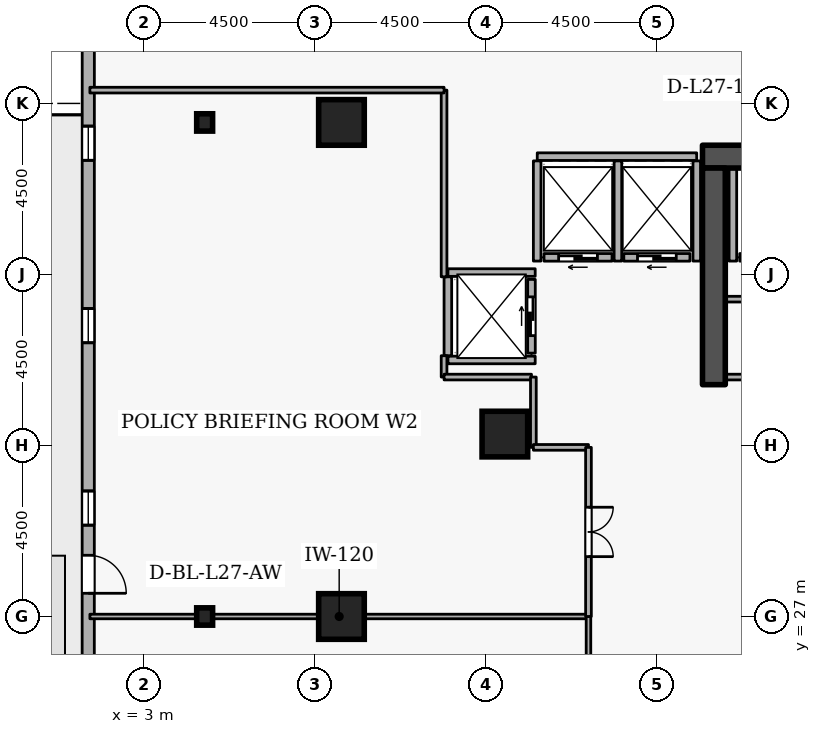
"""IFC4 building model, lengths in metres.
Left out: names, types, materials, properties, quantities, classifications, styles, units other than length and angle.
Written with IfcOpenShell. Run it as: python <this file> out.ifc"""

import sys

from ifc_helpers import new_model, si_unit, direction, frame, frame_2d, origin, origin_2d, place, context, subcontext, project, spatial, rectangle, i_section, extrude, element, fill, save


model = new_model("IFC4")
c1 = context("Model", 3, precision=1e-05, world=origin(), true_north=direction((0.0, 1.0)))
c2 = subcontext(c1, "Body", "Model", "MODEL_VIEW")
j1 = project(units=[si_unit("LENGTHUNIT", "METRE"), si_unit("PLANEANGLEUNIT", "RADIAN")], contexts=[c1])
p1 = place(None, origin())
s1 = spatial("IfcSite", under=j1, at=p1, CompositionType="ELEMENT")
p2 = place(p1, origin())
s2 = spatial("IfcBuilding", under=s1, at=p2, CompositionType="ELEMENT")
p3 = place(p2, frame((0.0, 0.0, 105.3)))
s3 = spatial("IfcBuildingStorey", under=s2, at=p3, CompositionType="ELEMENT", Elevation=105.3)
p4 = place(p3, frame((17.7, 39.1, 0.0), z_axis=(0.0, 0.0, 1.0), x_axis=(1.0, 0.0, 0.0)))
e1 = element("IfcWall", 1, at=p4, inside=s3, PredefinedType="SHEAR", context=c2, shape_type="SweptSolid", body=[
    extrude(rectangle(XDim=15.6, YDim=0.6, at=frame_2d((7.8, 0.0))), origin(), (0.0, 0.0, 1.0), 3.6),
])
p5 = place(p3, frame((18.0, 33.1, 0.0), z_axis=(0.0, 0.0, 1.0), x_axis=(0.0, 1.0, 0.0)))
e2 = element("IfcWall", 2, at=p5, inside=s3, PredefinedType="SHEAR", context=c2, shape_type="SweptSolid", body=[
    extrude(rectangle(XDim=5.7, YDim=0.6, at=frame_2d((2.85, 0.0))), origin(), (0.0, 0.0, 1.0), 3.6),
])
for number, where, z_axis, x_axis in (
    (3, (8.2, 27.0, 0.0), (0.0, 0.0, 1.0), (1.0, 0.0, 0.0)),
    (4, (8.2, 40.0, 0.0), (0.0, 0.0, 1.0), (1.0, 0.0, 0.0)),
    (5, (12.5, 31.8, 0.0), (0.0, 0.0, 1.0), (1.0, 0.0, 0.0)),
):
    element("IfcColumn", number, at=place(p3, frame(where, z_axis=z_axis, x_axis=x_axis)), inside=s3, PredefinedType="COLUMN", context=c2, shape_type="SweptSolid", body=[
        extrude(rectangle(XDim=1.2, YDim=1.2, at=origin_2d()), origin(), (0.0, 0.0, 1.0), 3.6),
    ])
for number, where, z_axis, x_axis in (
    (6, (4.6, 27.0, 0.0), (0.0, 0.0, 1.0), (1.0, 0.0, 0.0)),
    (7, (4.6, 40.0, 0.0), (0.0, 0.0, 1.0), (1.0, 0.0, 0.0)),
):
    element("IfcColumn", number, at=place(p3, frame(where, z_axis=z_axis, x_axis=x_axis)), inside=s3, PredefinedType="COLUMN", context=c2, shape_type="SweptSolid", body=[
        extrude(i_section(OverallWidth=0.418, OverallDepth=0.456, WebThickness=0.042, FlangeThickness=0.067, FilletRadius=0.015, at=origin_2d()), origin(), (0.0, 0.0, 1.0), 3.6),
    ])
p6 = place(p3, frame((1.539, 47.403, 0.0), z_axis=(0.0, 0.0, 1.0), x_axis=(-8.8693006e-05, -0.999999996067, 0.0)))
e8 = element("IfcWall", 8, at=p6, inside=s3, PredefinedType="STANDARD", context=c2, shape_type="SweptSolid", body=[
    extrude(rectangle(XDim=35.784, YDim=0.32, at=frame_2d((17.892, 0.0))), origin(), (0.0, 0.0, 1.0), 2.7),
])
p7 = place(p6, frame((18.792, 0.0, 0.0)))
e9 = element("IfcOpeningElement", 9, at=p7, cuts=e8, PredefinedType="OPENING", context=c2, shape_type="SweptSolid", body=[
    extrude(rectangle(XDim=1.0, YDim=2.08, at=frame_2d((0.5, 1.04))), frame((0.0, 0.17, 0.0), z_axis=(0.0, -1.0, 0.0), x_axis=(1.0, 0.0, 0.0)), (0.0, 0.0, 1.0), 0.34),
])
p8 = place(p6, frame((2.7, 0.0, 0.72)))
e10 = element("IfcOpeningElement", 10, at=p8, cuts=e8, PredefinedType="OPENING", context=c2, shape_type="SweptSolid", body=[
    extrude(rectangle(XDim=0.9, YDim=1.75, at=frame_2d((0.45, 0.875))), frame((0.0, 0.17, 0.0), z_axis=(0.0, -1.0, 0.0), x_axis=(1.0, 0.0, 0.0)), (0.0, 0.0, 1.0), 0.34),
])
p9 = place(p6, frame((7.5, 0.0, 0.72)))
e11 = element("IfcOpeningElement", 11, at=p9, cuts=e8, PredefinedType="OPENING", context=c2, shape_type="SweptSolid", body=[
    extrude(rectangle(XDim=0.9, YDim=1.75, at=frame_2d((0.45, 0.875))), frame((0.0, 0.17, 0.0), z_axis=(0.0, -1.0, 0.0), x_axis=(1.0, 0.0, 0.0)), (0.0, 0.0, 1.0), 0.34),
])
p10 = place(p6, frame((12.3, 0.0, 0.72)))
e12 = element("IfcOpeningElement", 12, at=p10, cuts=e8, PredefinedType="OPENING", context=c2, shape_type="SweptSolid", body=[
    extrude(rectangle(XDim=0.9, YDim=1.75, at=frame_2d((0.45, 0.875))), frame((0.0, 0.17, 0.0), z_axis=(0.0, -1.0, 0.0), x_axis=(1.0, 0.0, 0.0)), (0.0, 0.0, 1.0), 0.34),
])
p11 = place(p6, frame((17.1, 0.0, 0.72)))
e13 = element("IfcOpeningElement", 13, at=p11, cuts=e8, PredefinedType="OPENING", context=c2, shape_type="SweptSolid", body=[
    extrude(rectangle(XDim=0.9, YDim=1.75, at=frame_2d((0.45, 0.875))), frame((0.0, 0.17, 0.0), z_axis=(0.0, -1.0, 0.0), x_axis=(1.0, 0.0, 0.0)), (0.0, 0.0, 1.0), 0.34),
])
p12 = place(p6, frame((21.9, 0.0, 0.72)))
e14 = element("IfcOpeningElement", 14, at=p12, cuts=e8, PredefinedType="OPENING", context=c2, shape_type="SweptSolid", body=[
    extrude(rectangle(XDim=0.9, YDim=1.75, at=frame_2d((0.45, 0.875))), frame((0.0, 0.17, 0.0), z_axis=(0.0, -1.0, 0.0), x_axis=(1.0, 0.0, 0.0)), (0.0, 0.0, 1.0), 0.34),
])
p13 = place(p6, frame((26.7, 0.0, 0.72)))
e15 = element("IfcOpeningElement", 15, at=p13, cuts=e8, PredefinedType="OPENING", context=c2, shape_type="SweptSolid", body=[
    extrude(rectangle(XDim=0.9, YDim=1.75, at=frame_2d((0.45, 0.875))), frame((0.0, 0.17, 0.0), z_axis=(0.0, -1.0, 0.0), x_axis=(1.0, 0.0, 0.0)), (0.0, 0.0, 1.0), 0.34),
])
p14 = place(p6, frame((31.5, 0.0, 0.72)))
e16 = element("IfcOpeningElement", 16, at=p14, cuts=e8, PredefinedType="OPENING", context=c2, shape_type="SweptSolid", body=[
    extrude(rectangle(XDim=0.9, YDim=1.75, at=frame_2d((0.45, 0.875))), frame((0.0, 0.17, 0.0), z_axis=(0.0, -1.0, 0.0), x_axis=(1.0, 0.0, 0.0)), (0.0, 0.0, 1.0), 0.34),
])
p15 = place(p3, frame((20.62, 36.45, 0.0), z_axis=(0.0, 0.0, 1.0), x_axis=(-1.0, 0.0, 0.0)))
e17 = element("IfcWall", 17, at=p15, inside=s3, PredefinedType="STANDARD", context=c2, shape_type="SweptSolid", body=[
    extrude(rectangle(XDim=1.94, YDim=0.2, at=frame_2d((0.97, 0.0))), origin(), (0.0, 0.0, 1.0), 3.34),
])
p16 = place(p3, frame((17.37, 36.45, 0.0), z_axis=(0.0, 0.0, 1.0), x_axis=(-1.0, 0.0, 0.0)))
e18 = element("IfcWall", 18, at=p16, inside=s3, PredefinedType="STANDARD", context=c2, shape_type="SweptSolid", body=[
    extrude(rectangle(XDim=1.74, YDim=0.2, at=frame_2d((0.87, 0.0))), origin(), (0.0, 0.0, 1.0), 3.34),
])
p17 = place(p16, frame((0.36, 0.0, 0.0)))
e19 = element("IfcOpeningElement", 19, at=p17, cuts=e18, PredefinedType="OPENING", context=c2, shape_type="SweptSolid", body=[
    extrude(rectangle(XDim=1.02, YDim=2.06, at=frame_2d((0.51, 1.03))), frame((0.0, 0.11, 0.0), z_axis=(0.0, -1.0, 0.0), x_axis=(1.0, 0.0, 0.0)), (0.0, 0.0, 1.0), 0.22),
])
p18 = place(p3, frame((15.32, 36.45, 0.0), z_axis=(0.0, 0.0, 1.0), x_axis=(-1.0, 0.0, 0.0)))
e20 = element("IfcWall", 20, at=p18, inside=s3, PredefinedType="STANDARD", context=c2, shape_type="SweptSolid", body=[
    extrude(rectangle(XDim=1.79, YDim=0.2, at=frame_2d((0.895, 0.0))), origin(), (0.0, 0.0, 1.0), 3.34),
])
p19 = place(p18, frame((0.385, 0.0, 0.0)))
e21 = element("IfcOpeningElement", 21, at=p19, cuts=e20, PredefinedType="OPENING", context=c2, shape_type="SweptSolid", body=[
    extrude(rectangle(XDim=1.02, YDim=2.06, at=frame_2d((0.51, 1.03))), frame((0.0, 0.11, 0.0), z_axis=(0.0, -1.0, 0.0), x_axis=(1.0, 0.0, 0.0)), (0.0, 0.0, 1.0), 0.22),
])
p20 = place(p3, frame((13.2, 33.93, 0.0), z_axis=(0.0, 0.0, 1.0), x_axis=(0.0, 1.0, 0.0)))
e22 = element("IfcWall", 22, at=p20, inside=s3, PredefinedType="STANDARD", context=c2, shape_type="SweptSolid", body=[
    extrude(rectangle(XDim=1.94, YDim=0.2, at=frame_2d((0.97, 0.0))), origin(), (0.0, 0.0, 1.0), 3.34),
])
p21 = place(p20, frame((0.46, 0.0, 0.0)))
e23 = element("IfcOpeningElement", 23, at=p21, cuts=e22, PredefinedType="OPENING", context=c2, shape_type="SweptSolid", body=[
    extrude(rectangle(XDim=1.02, YDim=2.06, at=frame_2d((0.51, 1.03))), frame((0.0, 0.11, 0.0), z_axis=(0.0, -1.0, 0.0), x_axis=(1.0, 0.0, 0.0)), (0.0, 0.0, 1.0), 0.22),
])
p22 = place(p3, frame((18.5, 36.352, 0.0), z_axis=(0.0, 0.0, 1.0), x_axis=(0.0, 1.0, 0.0)))
e24 = element("IfcWall", 24, at=p22, inside=s3, PredefinedType="STANDARD", context=c2, shape_type="SweptSolid", body=[
    extrude(rectangle(XDim=2.436, YDim=0.2, at=frame_2d((1.218, 0.0))), origin(), (0.0, 0.0, 1.0), 3.34),
])
p23 = place(p3, frame((13.352, 39.1, 0.0), z_axis=(0.0, 0.0, 1.0), x_axis=(1.0, 0.0, 0.0)))
e25 = element("IfcWall", 25, at=p23, inside=s3, PredefinedType="STANDARD", context=c2, shape_type="SweptSolid", body=[
    extrude(rectangle(XDim=4.196, YDim=0.2, at=frame_2d((2.098, 0.0))), origin(), (0.0, 0.0, 1.0), 3.34),
])
p24 = place(p3, frame((17.55, 36.352, 0.0), z_axis=(0.0, 0.0, 1.0), x_axis=(0.0, 1.0, 0.0)))
e26 = element("IfcWall", 26, at=p24, inside=s3, PredefinedType="STANDARD", context=c2, shape_type="SweptSolid", body=[
    extrude(rectangle(XDim=2.636, YDim=0.2, at=frame_2d((1.318, 0.0))), origin(), (0.0, 0.0, 1.0), 2.545),
])
for number, where, z_axis, x_axis in (
    (27, (15.475, 36.352, 0.0), (0.0, 0.0, 1.0), (0.0, 1.0, 0.0)),
    (28, (13.35, 36.352, 0.0), (0.0, 0.0, 1.0), (0.0, 1.0, 0.0)),
):
    element("IfcWall", number, at=place(p3, frame(where, z_axis=z_axis, x_axis=x_axis)), inside=s3, PredefinedType="STANDARD", context=c2, shape_type="SweptSolid", body=[
        extrude(rectangle(XDim=2.636, YDim=0.2, at=frame_2d((1.318, 0.0))), origin(), (0.0, 0.0, 1.0), 3.34),
    ])
for number, where, z_axis, x_axis in (
    (29, (11.002, 36.05, 0.0), (0.0, 0.0, 1.0), (1.0, 0.0, 0.0)),
    (30, (11.002, 33.75, 0.0), (0.0, 0.0, 1.0), (1.0, 0.0, 0.0)),
):
    element("IfcWall", number, at=place(p3, frame(where, z_axis=z_axis, x_axis=x_axis)), inside=s3, PredefinedType="STANDARD", context=c2, shape_type="SweptSolid", body=[
        extrude(rectangle(XDim=2.296, YDim=0.2, at=frame_2d((1.148, 0.0))), origin(), (0.0, 0.0, 1.0), 3.34),
    ])
p25 = place(p3, frame((11.0, 33.862, 0.0), z_axis=(0.0, 0.0, 1.0), x_axis=(0.0, 1.0, 0.0)))
e31 = element("IfcWall", 31, at=p25, inside=s3, PredefinedType="STANDARD", context=c2, shape_type="SweptSolid", body=[
    extrude(rectangle(XDim=2.076, YDim=0.2, at=frame_2d((1.038, 0.0))), origin(), (0.0, 0.0, 1.0), 3.34),
])
p26 = place(p3, frame((18.3, 35.35, 0.0), z_axis=(0.0, 0.0, 1.0), x_axis=(1.0, 0.0, 0.0)))
e32 = element("IfcWall", 32, at=p26, inside=s3, PredefinedType="PARTITIONING", context=c2, shape_type="SweptSolid", body=[
    extrude(rectangle(XDim=4.25, YDim=0.15, at=frame_2d((2.125, 0.0))), origin(), (0.0, 0.0, 1.0), 3.34),
])
p27 = place(p3, frame((22.55, 33.3, 0.0), z_axis=(0.0, 0.0, 1.0), x_axis=(-1.0, 0.0, 0.0)))
e33 = element("IfcWall", 33, at=p27, inside=s3, PredefinedType="PARTITIONING", context=c2, shape_type="SweptSolid", body=[
    extrude(rectangle(XDim=4.25, YDim=0.15, at=frame_2d((2.125, 0.0))), origin(), (0.0, 0.0, 1.0), 3.34),
])
p28 = place(p27, frame((1.665, 0.0, 0.0)))
e34 = element("IfcOpeningElement", 34, at=p28, cuts=e33, PredefinedType="OPENING", context=c2, shape_type="SweptSolid", body=[
    extrude(rectangle(XDim=0.92, YDim=2.08, at=frame_2d((0.46, 1.04))), frame((0.0, 0.085, 0.0), z_axis=(0.0, -1.0, 0.0), x_axis=(1.0, 0.0, 0.0)), (0.0, 0.0, 1.0), 0.17),
])
p29 = place(p3, frame((1.58, 27.0, 0.0), z_axis=(0.0, 0.0, 1.0), x_axis=(1.0, 0.0, 0.0)))
e35 = element("IfcWall", 35, at=p29, inside=s3, PredefinedType="PARTITIONING", context=c2, shape_type="SweptSolid", body=[
    extrude(rectangle(XDim=13.12, YDim=0.12, at=frame_2d((6.56, 0.0))), origin(), (0.0, 0.0, 1.0), 2.878),
])
p30 = place(p3, frame((14.7, 27.0, 0.0), z_axis=(0.0, 0.0, 1.0), x_axis=(0.0, -1.0, 0.0)))
e36 = element("IfcWall", 36, at=p30, inside=s3, PredefinedType="PARTITIONING", context=c2, shape_type="SweptSolid", body=[
    extrude(rectangle(XDim=4.45, YDim=0.12, at=frame_2d((2.225, 0.0))), origin(), (0.0, 0.0, 1.0), 3.34),
])
p31 = place(p30, frame((1.7, 0.0, 0.0)))
e37 = element("IfcOpeningElement", 37, at=p31, cuts=e36, PredefinedType="OPENING", context=c2, shape_type="SweptSolid", body=[
    extrude(rectangle(XDim=1.05, YDim=2.1, at=frame_2d((0.525, 1.05))), frame((0.0, 0.07, 0.0), z_axis=(0.0, -1.0, 0.0), x_axis=(1.0, 0.0, 0.0)), (0.0, 0.0, 1.0), 0.14),
])
p32 = place(p3, frame((10.9, 40.85, 0.0), z_axis=(0.0, 0.0, 1.0), x_axis=(0.0, -1.0, 0.0)))
e38 = element("IfcWall", 38, at=p32, inside=s3, PredefinedType="PARTITIONING", context=c2, shape_type="SweptSolid", body=[
    extrude(rectangle(XDim=4.912, YDim=0.15, at=frame_2d((2.456, 0.0))), origin(), (0.0, 0.0, 1.0), 3.34),
])
p33 = place(p3, frame((10.9, 33.862, 0.0), z_axis=(0.0, 0.0, 1.0), x_axis=(0.0, -1.0, 0.0)))
e39 = element("IfcWall", 39, at=p33, inside=s3, PredefinedType="PARTITIONING", context=c2, shape_type="SweptSolid", body=[
    extrude(rectangle(XDim=0.562, YDim=0.15, at=frame_2d((0.281, 0.0))), origin(), (0.0, 0.0, 1.0), 3.34),
])
p34 = place(p3, frame((10.9, 33.3, 0.0), z_axis=(0.0, 0.0, 1.0), x_axis=(1.0, 0.0, 0.0)))
e40 = element("IfcWall", 40, at=p34, inside=s3, PredefinedType="PARTITIONING", context=c2, shape_type="SweptSolid", body=[
    extrude(rectangle(XDim=2.3, YDim=0.15, at=frame_2d((1.15, 0.0))), origin(), (0.0, 0.0, 1.0), 3.34),
])
p35 = place(p3, frame((13.25, 33.3, 0.0), z_axis=(0.0, 0.0, 1.0), x_axis=(0.0, -1.0, 0.0)))
e41 = element("IfcWall", 41, at=p35, inside=s3, PredefinedType="PARTITIONING", context=c2, shape_type="SweptSolid", body=[
    extrude(rectangle(XDim=1.85, YDim=0.15, at=frame_2d((0.925, 0.0))), origin(), (0.0, 0.0, 1.0), 3.34),
])
p36 = place(p3, frame((13.25, 31.45, 0.0), z_axis=(0.0, 0.0, 1.0), x_axis=(1.0, 0.0, 0.0)))
e42 = element("IfcWall", 42, at=p36, inside=s3, PredefinedType="PARTITIONING", context=c2, shape_type="SweptSolid", body=[
    extrude(rectangle(XDim=1.45, YDim=0.15, at=frame_2d((0.725, 0.0))), origin(), (0.0, 0.0, 1.0), 3.34),
])
p37 = place(p3, frame((14.7, 31.45, 0.0), z_axis=(0.0, 0.0, 1.0), x_axis=(0.0, -1.0, 0.0)))
e43 = element("IfcWall", 43, at=p37, inside=s3, PredefinedType="PARTITIONING", context=c2, shape_type="SweptSolid", body=[
    extrude(rectangle(XDim=4.45, YDim=0.15, at=frame_2d((2.225, 0.0))), origin(), (0.0, 0.0, 1.0), 3.34),
])
p38 = place(p37, frame((1.575, 0.0, 0.0)))
e44 = element("IfcOpeningElement", 44, at=p38, cuts=e43, PredefinedType="OPENING", context=c2, shape_type="SweptSolid", body=[
    extrude(rectangle(XDim=1.3, YDim=2.12, at=frame_2d((0.65, 1.06))), frame((0.0, 0.085, 0.0), z_axis=(0.0, -1.0, 0.0), x_axis=(1.0, 0.0, 0.0)), (0.0, 0.0, 1.0), 0.17),
])
p39 = place(p3, frame((1.58, 40.85, 0.0), z_axis=(0.0, 0.0, 1.0), x_axis=(1.0, 0.0, 0.0)))
e45 = element("IfcWall", 45, at=p39, inside=s3, PredefinedType="PARTITIONING", context=c2, shape_type="SweptSolid", body=[
    extrude(rectangle(XDim=9.32, YDim=0.15, at=frame_2d((4.66, 0.0))), origin(), (0.0, 0.0, 1.0), 3.34),
])
p40 = place(p7, origin())
e46 = element("IfcDoor", 46, at=p40, inside=s3, OperationType="SINGLE_SWING_RIGHT", PredefinedType="DOOR", context=c2, shape_type="SweptSolid", body=[
    extrude(rectangle(XDim=1.0, YDim=2.08, at=frame_2d((0.5, 1.04))), frame((0.0, 0.025, 0.0), z_axis=(0.0, -1.0, 0.0), x_axis=(1.0, 0.0, 0.0)), (0.0, 0.0, 1.0), 0.05),
])
fill(e9, e46)
p41 = place(p9, origin())
e47 = element("IfcWindow", 47, at=p41, inside=s3, PartitioningType="SINGLE_PANEL", PredefinedType="WINDOW", context=c2, shape_type="SweptSolid", body=[
    extrude(rectangle(XDim=0.9, YDim=1.75, at=frame_2d((0.45, 0.875))), frame((0.0, 0.03, 0.0), z_axis=(0.0, -1.0, 0.0), x_axis=(1.0, 0.0, 0.0)), (0.0, 0.0, 1.0), 0.06),
])
fill(e11, e47)
p42 = place(p10, origin())
e48 = element("IfcWindow", 48, at=p42, inside=s3, PartitioningType="SINGLE_PANEL", PredefinedType="WINDOW", context=c2, shape_type="SweptSolid", body=[
    extrude(rectangle(XDim=0.9, YDim=1.75, at=frame_2d((0.45, 0.875))), frame((0.0, 0.03, 0.0), z_axis=(0.0, -1.0, 0.0), x_axis=(1.0, 0.0, 0.0)), (0.0, 0.0, 1.0), 0.06),
])
fill(e12, e48)
p43 = place(p11, origin())
e49 = element("IfcWindow", 49, at=p43, inside=s3, PartitioningType="SINGLE_PANEL", PredefinedType="WINDOW", context=c2, shape_type="SweptSolid", body=[
    extrude(rectangle(XDim=0.9, YDim=1.75, at=frame_2d((0.45, 0.875))), frame((0.0, 0.03, 0.0), z_axis=(0.0, -1.0, 0.0), x_axis=(1.0, 0.0, 0.0)), (0.0, 0.0, 1.0), 0.06),
])
fill(e13, e49)
p44 = place(p17, origin())
e50 = element("IfcDoor", 50, at=p44, inside=s3, OperationType="SLIDING_TO_LEFT", PredefinedType="DOOR", context=c2, shape_type="SweptSolid", body=[
    extrude(rectangle(XDim=1.02, YDim=2.06, at=frame_2d((0.51, 1.03))), frame((0.0, 0.025, 0.0), z_axis=(0.0, -1.0, 0.0), x_axis=(1.0, 0.0, 0.0)), (0.0, 0.0, 1.0), 0.05),
])
fill(e19, e50)
p45 = place(p19, origin())
e51 = element("IfcDoor", 51, at=p45, inside=s3, OperationType="SLIDING_TO_LEFT", PredefinedType="DOOR", context=c2, shape_type="SweptSolid", body=[
    extrude(rectangle(XDim=1.02, YDim=2.06, at=frame_2d((0.51, 1.03))), frame((0.0, 0.025, 0.0), z_axis=(0.0, -1.0, 0.0), x_axis=(1.0, 0.0, 0.0)), (0.0, 0.0, 1.0), 0.05),
])
fill(e21, e51)
p46 = place(p21, origin())
e52 = element("IfcDoor", 52, at=p46, inside=s3, OperationType="SLIDING_TO_LEFT", PredefinedType="DOOR", context=c2, shape_type="SweptSolid", body=[
    extrude(rectangle(XDim=1.02, YDim=2.06, at=frame_2d((0.51, 1.03))), frame((0.0, 0.025, 0.0), z_axis=(0.0, -1.0, 0.0), x_axis=(1.0, 0.0, 0.0)), (0.0, 0.0, 1.0), 0.05),
])
fill(e23, e52)
p47 = place(p38, origin())
e53 = element("IfcDoor", 53, at=p47, inside=s3, OperationType="DOUBLE_DOOR_SINGLE_SWING", PredefinedType="DOOR", context=c2, shape_type="SweptSolid", body=[
    extrude(rectangle(XDim=1.3, YDim=2.12, at=frame_2d((0.65, 1.06))), frame((0.0, 0.025, 0.0), z_axis=(0.0, -1.0, 0.0), x_axis=(1.0, 0.0, 0.0)), (0.0, 0.0, 1.0), 0.05),
])
fill(e44, e53)
save(model, sys.argv[1])
